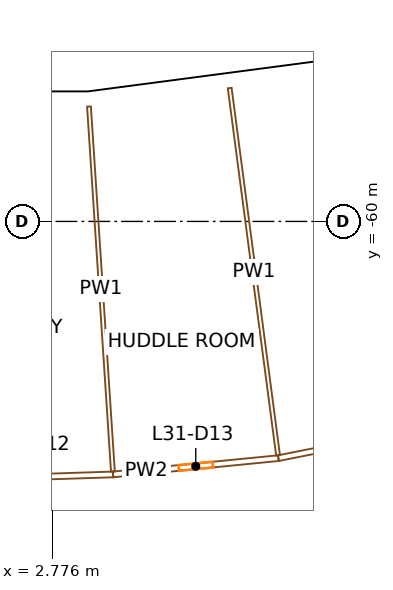
"""IFC4 building model, lengths in metres.
Left out: names, types, materials, properties, quantities, classifications, styles, units other than length and angle.
Written with IfcOpenShell. Run it as: python <this file> out.ifc"""

import sys

from ifc_helpers import new_model, si_unit, direction, frame, frame_2d, origin, origin_2d, place, context, subcontext, project, spatial, rectangle, extrude, element, fill, save


model = new_model("IFC4")
c1 = context("Model", 3, precision=1e-05, world=origin(), true_north=direction((0.0, 1.0)))
c2 = subcontext(c1, "Body", "Model", "MODEL_VIEW")
j1 = project(units=[si_unit("LENGTHUNIT", "METRE"), si_unit("PLANEANGLEUNIT", "RADIAN")], contexts=[c1])
p1 = place(None, origin())
s1 = spatial("IfcSite", under=j1, at=p1, CompositionType="ELEMENT")
p2 = place(p1, origin())
s2 = spatial("IfcBuilding", under=s1, at=p2, CompositionType="ELEMENT")
p3 = place(p2, frame((0.0, 0.0, 136.7)))
s3 = spatial("IfcBuildingStorey", under=s2, at=p3, CompositionType="ELEMENT", Elevation=136.7)
p4 = place(p3, frame((3.81, -58.125, 0.0), z_axis=(0.0, 0.0, 1.0), x_axis=(0.997858923239, 0.06540312923, 0.0)))
e1 = element("IfcColumn", 1, at=p4, inside=s3, PredefinedType="COLUMN", context=c2, shape_type="SweptSolid", body=[
    extrude(rectangle(XDim=1.2, YDim=1.5, at=origin_2d()), origin(), (0.0, 0.0, 1.0), 3.8),
])
p5 = place(p3, frame((11.125, -55.804, 0.0), z_axis=(0.0, 0.0, 1.0), x_axis=(-0.991444533306, -0.130528684121, 0.0)))
e2 = element("IfcWall", 2, at=p5, inside=s3, PredefinedType="SOLIDWALL", context=c2, shape_type="SweptSolid", body=[
    extrude(rectangle(XDim=7.493, YDim=0.4, at=frame_2d((3.747, 0.0))), origin(), (0.0, 0.0, 1.0), 2.7),
])
p6 = place(p5, frame((4.301, 0.0, 0.9)))
e3 = element("IfcOpeningElement", 3, at=p6, cuts=e2, PredefinedType="OPENING", context=c2, shape_type="SweptSolid", body=[
    extrude(rectangle(XDim=2.6, YDim=1.65, at=frame_2d((1.3, 0.825))), frame((0.0, 0.21, 0.0), z_axis=(0.0, -1.0, 0.0), x_axis=(1.0, 0.0, 0.0)), (0.0, 0.0, 1.0), 0.42),
])
p7 = place(p5, frame((0.592, 0.0, 0.9)))
e4 = element("IfcOpeningElement", 4, at=p7, cuts=e2, PredefinedType="OPENING", context=c2, shape_type="SweptSolid", body=[
    extrude(rectangle(XDim=2.6, YDim=1.65, at=frame_2d((1.3, 0.825))), frame((0.0, 0.21, 0.0), z_axis=(0.0, -1.0, 0.0), x_axis=(1.0, 0.0, 0.0)), (0.0, 0.0, 1.0), 0.42),
])
p8 = place(p3, frame((3.671, -56.779, 0.0), z_axis=(0.0, 0.0, 1.0), x_axis=(-1.0, 0.0, 0.0)))
e5 = element("IfcWall", 5, at=p8, inside=s3, PredefinedType="SOLIDWALL", context=c2, shape_type="SweptSolid", body=[
    extrude(rectangle(XDim=7.341, YDim=0.4, at=frame_2d((3.671, 0.0))), origin(), (0.0, 0.0, 1.0), 2.7),
])
p9 = place(p8, frame((4.225, 0.0, 0.9)))
e6 = element("IfcOpeningElement", 6, at=p9, cuts=e5, PredefinedType="OPENING", context=c2, shape_type="SweptSolid", body=[
    extrude(rectangle(XDim=2.6, YDim=1.65, at=frame_2d((1.3, 0.825))), frame((0.0, 0.21, 0.0), z_axis=(0.0, -1.0, 0.0), x_axis=(1.0, 0.0, 0.0)), (0.0, 0.0, 1.0), 0.42),
])
p10 = place(p8, frame((0.517, 0.0, 0.9)))
e7 = element("IfcOpeningElement", 7, at=p10, cuts=e5, PredefinedType="OPENING", context=c2, shape_type="SweptSolid", body=[
    extrude(rectangle(XDim=2.6, YDim=1.65, at=frame_2d((1.3, 0.825))), frame((0.0, 0.21, 0.0), z_axis=(0.0, -1.0, 0.0), x_axis=(1.0, 0.0, 0.0)), (0.0, 0.0, 1.0), 0.42),
])
p11 = place(p3, frame((0.0, -66.8, 0.0), z_axis=(0.0, 0.0, 1.0), x_axis=(0.99946426167, 0.03272903366, 0.0)))
e8 = element("IfcWall", 8, at=p11, inside=s3, PredefinedType="PARTITIONING", context=c2, shape_type="SweptSolid", body=[
    extrude(rectangle(XDim=4.371, YDim=0.15, at=frame_2d((2.186, 0.0))), origin(), (0.0, 0.0, 1.0), 2.4),
])
p12 = place(p11, frame((1.736, 0.0, 0.0)))
e9 = element("IfcOpeningElement", 9, at=p12, cuts=e8, PredefinedType="OPENING", context=c2, shape_type="SweptSolid", body=[
    extrude(rectangle(XDim=0.9, YDim=2.1, at=frame_2d((0.45, 1.05))), frame((0.0, 0.085, 0.0), z_axis=(0.0, -1.0, 0.0), x_axis=(1.0, 0.0, 0.0)), (0.0, 0.0, 1.0), 0.17),
])
p13 = place(p3, frame((3.735, -56.978, 0.0), z_axis=(0.0, 0.0, 1.0), x_axis=(0.065392665599, -0.997859609006, 0.0)))
e10 = element("IfcWall", 10, at=p13, inside=s3, PredefinedType="PARTITIONING", context=c2, shape_type="SweptSolid", body=[
    extrude(rectangle(XDim=9.625, YDim=0.1, at=frame_2d((4.812, 0.0))), origin(), (0.0, 0.0, 1.0), 2.4),
])
p14 = place(p3, frame((4.369, -66.657, 0.0), z_axis=(0.0, 0.0, 1.0), x_axis=(0.995184826457, 0.098016127192, 0.0)))
e11 = element("IfcWall", 11, at=p14, inside=s3, PredefinedType="PARTITIONING", context=c2, shape_type="SweptSolid", body=[
    extrude(rectangle(XDim=4.371, YDim=0.15, at=frame_2d((2.186, 0.0))), origin(), (0.0, 0.0, 1.0), 2.4),
])
p15 = place(p14, frame((1.736, 0.0, 0.0)))
e12 = element("IfcOpeningElement", 12, at=p15, cuts=e11, PredefinedType="OPENING", context=c2, shape_type="SweptSolid", body=[
    extrude(rectangle(XDim=0.9, YDim=2.1, at=frame_2d((0.45, 1.05))), frame((0.0, 0.085, 0.0), z_axis=(0.0, -1.0, 0.0), x_axis=(1.0, 0.0, 0.0)), (0.0, 0.0, 1.0), 0.17),
])
p16 = place(p3, frame((7.437, -56.491, 0.0), z_axis=(0.0, 0.0, 1.0), x_axis=(0.13053421433, -0.99144380521, 0.0)))
e13 = element("IfcWall", 13, at=p16, inside=s3, PredefinedType="PARTITIONING", context=c2, shape_type="SweptSolid", body=[
    extrude(rectangle(XDim=9.746, YDim=0.1, at=frame_2d((4.873, 0.0))), origin(), (0.0, 0.0, 1.0), 2.4),
])
p17 = place(p3, frame((16.446, -67.217, 0.0), z_axis=(0.0, 0.0, 1.0), x_axis=(-0.984813412134, -0.173616080133, 0.0)))
e14 = element("IfcWall", 14, at=p17, inside=s3, PredefinedType="PARTITIONING", context=c2, shape_type="SweptSolid", body=[
    extrude(rectangle(XDim=9.052, YDim=0.15, at=frame_2d((4.526, 0.0))), origin(), (0.0, 0.0, 1.0), 2.4),
])
p18 = place(p17, frame((4.026, 0.0, 0.0)))
e15 = element("IfcOpeningElement", 15, at=p18, cuts=e14, PredefinedType="OPENING", context=c2, shape_type="SweptSolid", body=[
    extrude(rectangle(XDim=1.0, YDim=2.1, at=frame_2d((0.5, 1.05))), frame((0.0, 0.085, 0.0), z_axis=(0.0, -1.0, 0.0), x_axis=(1.0, 0.0, 0.0)), (0.0, 0.0, 1.0), 0.17),
])
p19 = place(p3, frame((8.719, -66.229, 0.0), z_axis=(0.0, 0.0, 1.0), x_axis=(0.980786466832, 0.195084357342, 0.0)))
e16 = element("IfcWall", 16, at=p19, inside=s3, PredefinedType="PARTITIONING", context=c2, shape_type="SweptSolid", body=[
    extrude(rectangle(XDim=8.738, YDim=0.15, at=frame_2d((4.369, 0.0))), origin(), (0.0, 0.0, 1.0), 2.4),
])
p20 = place(p19, frame((3.869, 0.0, 0.0)))
e17 = element("IfcOpeningElement", 17, at=p20, cuts=e16, PredefinedType="OPENING", context=c2, shape_type="SweptSolid", body=[
    extrude(rectangle(XDim=1.0, YDim=2.1, at=frame_2d((0.5, 1.05))), frame((0.0, 0.085, 0.0), z_axis=(0.0, -1.0, 0.0), x_axis=(1.0, 0.0, 0.0)), (0.0, 0.0, 1.0), 0.17),
])
p21 = place(p10, origin())
e18 = element("IfcWindow", 18, at=p21, inside=s3, PartitioningType="SINGLE_PANEL", PredefinedType="WINDOW", context=c2, shape_type="SweptSolid", body=[
    extrude(rectangle(XDim=2.6, YDim=1.65, at=frame_2d((1.3, 0.825))), frame((0.0, 0.03, 0.0), z_axis=(0.0, -1.0, 0.0), x_axis=(1.0, 0.0, 0.0)), (0.0, 0.0, 1.0), 0.06),
])
fill(e7, e18)
p22 = place(p6, origin())
e19 = element("IfcWindow", 19, at=p22, inside=s3, PartitioningType="SINGLE_PANEL", PredefinedType="WINDOW", context=c2, shape_type="SweptSolid", body=[
    extrude(rectangle(XDim=2.6, YDim=1.65, at=frame_2d((1.3, 0.825))), frame((0.0, 0.03, 0.0), z_axis=(0.0, -1.0, 0.0), x_axis=(1.0, 0.0, 0.0)), (0.0, 0.0, 1.0), 0.06),
])
fill(e3, e19)
p23 = place(p7, origin())
e20 = element("IfcWindow", 20, at=p23, inside=s3, PartitioningType="SINGLE_PANEL", PredefinedType="WINDOW", context=c2, shape_type="SweptSolid", body=[
    extrude(rectangle(XDim=2.6, YDim=1.65, at=frame_2d((1.3, 0.825))), frame((0.0, 0.03, 0.0), z_axis=(0.0, -1.0, 0.0), x_axis=(1.0, 0.0, 0.0)), (0.0, 0.0, 1.0), 0.06),
])
fill(e4, e20)
p24 = place(p15, origin())
e21 = element("IfcDoor", 21, at=p24, inside=s3, OperationType="SINGLE_SWING_RIGHT", PredefinedType="DOOR", context=c2, shape_type="SweptSolid", body=[
    extrude(rectangle(XDim=0.9, YDim=2.1, at=frame_2d((0.45, 1.05))), frame((0.0, 0.025, 0.0), z_axis=(0.0, -1.0, 0.0), x_axis=(1.0, 0.0, 0.0)), (0.0, 0.0, 1.0), 0.05),
])
fill(e12, e21)
save(model, sys.argv[1])
